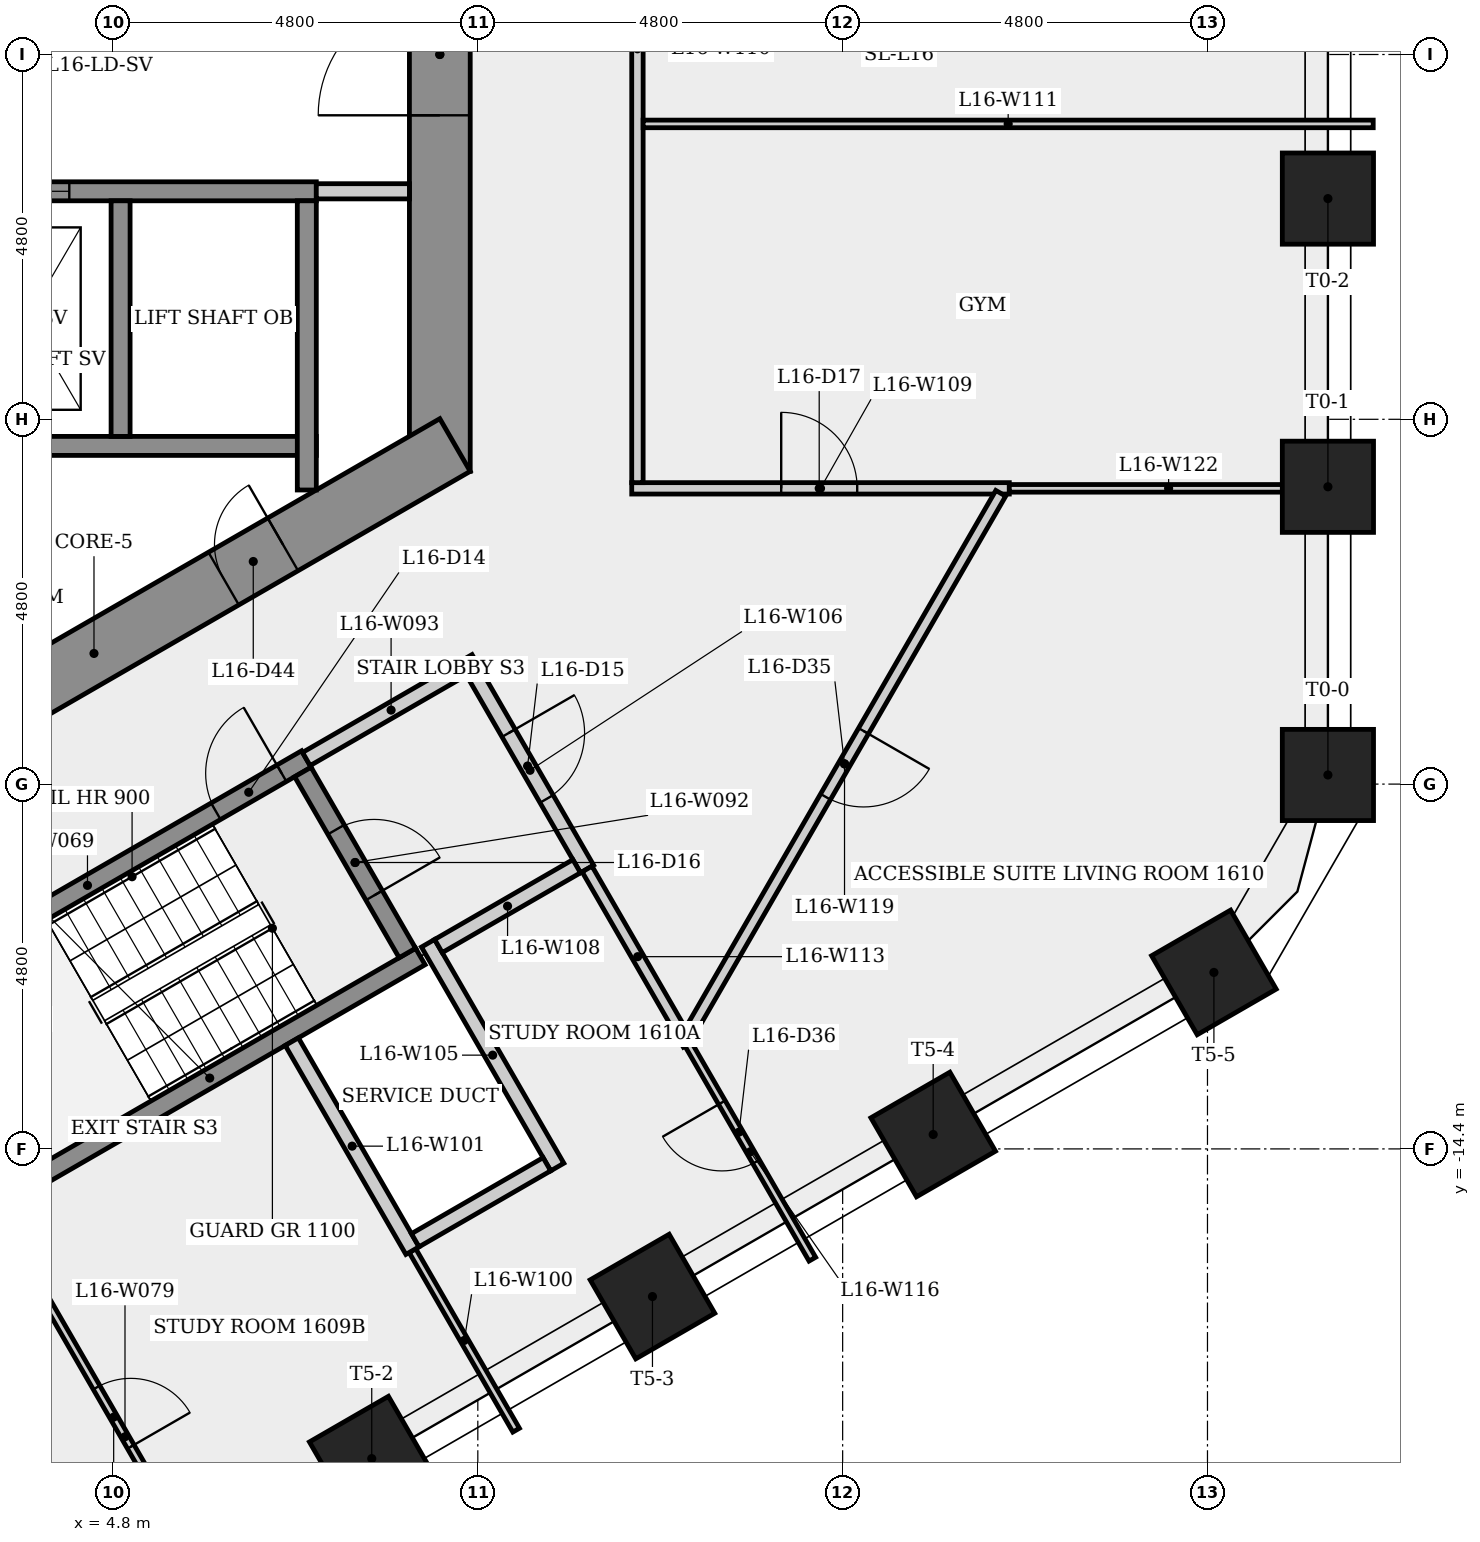
"""IFC4 building model, lengths in metres.
Left out: names, types, materials, properties, quantities, classifications, styles, units other than length and angle.
Written with IfcOpenShell. Run it as: python <this file> out.ifc"""

import sys

from ifc_helpers import new_model, si_unit, direction, frame, frame_2d, origin, origin_2d, place, context, subcontext, project, spatial, rectangle, extrude, element, fill, save


model = new_model("IFC4")
c1 = context("Model", 3, precision=1e-05, world=origin(), true_north=direction((0.0, 1.0)))
c2 = subcontext(c1, "Body", "Model", "MODEL_VIEW")
j1 = project(units=[si_unit("LENGTHUNIT", "METRE"), si_unit("PLANEANGLEUNIT", "RADIAN")], contexts=[c1])
p1 = place(None, origin())
s1 = spatial("IfcSite", under=j1, at=p1, CompositionType="ELEMENT")
p2 = place(p1, origin())
s2 = spatial("IfcBuilding", under=s1, at=p2, CompositionType="ELEMENT")
p3 = place(p2, frame((0.0, 0.0, 62.9)))
s3 = spatial("IfcBuildingStorey", under=s2, at=p3, CompositionType="ELEMENT", Elevation=62.9)
p4 = place(p3, frame((9.1, -5.485, 0.0), z_axis=(0.0, 0.0, 1.0), x_axis=(0.0, 1.0, 0.0)))
e1 = element("IfcWall", 1, at=p4, inside=s3, PredefinedType="SHEAR", context=c2, shape_type="SweptSolid", body=[
    extrude(rectangle(XDim=10.97, YDim=0.8, at=frame_2d((5.485, 0.0))), origin(), (0.0, 0.0, 1.0), 3.4),
])
p5 = place(p4, frame((4.685, 0.0, 0.0)))
e2 = element("IfcOpeningElement", 2, at=p5, cuts=e1, PredefinedType="OPENING", context=c2, shape_type="SweptSolid", body=[
    extrude(rectangle(XDim=1.6, YDim=2.1, at=frame_2d((0.8, 1.05))), frame((0.0, 0.41, 0.0), z_axis=(0.0, -1.0, 0.0), x_axis=(1.0, 0.0, 0.0)), (0.0, 0.0, 1.0), 0.82),
])
p6 = place(p3, frame((-0.2, -10.623, 0.0), z_axis=(0.0, 0.0, 1.0), x_axis=(0.866023993627, 0.500002442456, 0.0)))
e3 = element("IfcWall", 3, at=p6, inside=s3, PredefinedType="SHEAR", context=c2, shape_type="SweptSolid", body=[
    extrude(rectangle(XDim=10.97, YDim=0.8, at=frame_2d((5.485, 0.0))), origin(), (0.0, 0.0, 1.0), 3.4),
])
p7 = place(p6, frame((0.9, 0.0, 0.0)))
e4 = element("IfcOpeningElement", 4, at=p7, cuts=e3, PredefinedType="OPENING", context=c2, shape_type="SweptSolid", body=[
    extrude(rectangle(XDim=0.9, YDim=2.1, at=frame_2d((0.45, 1.05))), frame((0.0, 0.41, 0.0), z_axis=(0.0, -1.0, 0.0), x_axis=(1.0, 0.0, 0.0)), (0.0, 0.0, 1.0), 0.82),
])
p8 = place(p6, frame((7.455, 0.0, 0.0)))
e5 = element("IfcOpeningElement", 5, at=p8, cuts=e3, PredefinedType="OPENING", context=c2, shape_type="SweptSolid", body=[
    extrude(rectangle(XDim=0.9, YDim=2.1, at=frame_2d((0.45, 1.05))), frame((0.0, 0.41, 0.0), z_axis=(0.0, -1.0, 0.0), x_axis=(1.0, 0.0, 0.0)), (0.0, 0.0, 1.0), 0.82),
])
for number, where, z_axis, x_axis in (
    (6, (20.785, -9.48, 0.0), (0.0, 0.0, 1.0), (1.0, 0.0, 0.0)),
    (7, (20.785, -5.688, 0.0), (0.0, 0.0, 1.0), (1.0, 0.0, 0.0)),
    (8, (20.785, -1.896, 0.0), (0.0, 0.0, 1.0), (1.0, 0.0, 0.0)),
    (9, (8.204, -18.475, 0.0), (0.0, 0.0, 1.0), (0.5, -0.866, 0.0)),
    (10, (11.898, -16.343, 0.0), (0.0, 0.0, 1.0), (0.5, -0.866, 0.0)),
    (11, (15.591, -14.21, 0.0), (0.0, 0.0, 1.0), (0.5, -0.866, 0.0)),
    (12, (19.285, -12.078, 0.0), (0.0, 0.0, 1.0), (0.5, -0.866, 0.0)),
):
    element("IfcColumn", number, at=place(p3, frame(where, z_axis=z_axis, x_axis=x_axis)), inside=s3, PredefinedType="COLUMN", context=c2, shape_type="SweptSolid", body=[
        extrude(rectangle(XDim=1.2, YDim=1.2, at=origin_2d()), origin(), (0.0, 0.0, 1.0), 3.4),
    ])
p9 = place(p3, frame((-7.225, -5.15, 0.0), z_axis=(0.0, 0.0, 1.0), x_axis=(1.0, 0.0, 0.0)))
e13 = element("IfcWall", 13, at=p9, inside=s3, PredefinedType="SHEAR", context=c2, shape_type="SweptSolid", body=[
    extrude(rectangle(XDim=14.7, YDim=0.25, at=frame_2d((7.35, 0.0))), origin(), (0.0, 0.0, 1.0), 3.0),
])
p10 = place(p3, frame((-7.225, -1.8, 0.0), z_axis=(0.0, 0.0, 1.0), x_axis=(1.0, 0.0, 0.0)))
e14 = element("IfcWall", 14, at=p10, inside=s3, PredefinedType="SHEAR", context=c2, shape_type="SweptSolid", body=[
    extrude(rectangle(XDim=14.7, YDim=0.25, at=frame_2d((7.35, 0.0))), origin(), (0.0, 0.0, 1.0), 3.0),
])
p11 = place(p10, frame((0.597, 0.0, 0.0)))
e15 = element("IfcOpeningElement", 15, at=p11, cuts=e14, PredefinedType="OPENING", context=c2, shape_type="SweptSolid", body=[
    extrude(rectangle(XDim=1.1, YDim=2.1, at=frame_2d((0.55, 1.05))), frame((0.0, 0.135, 0.0), z_axis=(0.0, -1.0, 0.0), x_axis=(1.0, 0.0, 0.0)), (0.0, 0.0, 1.0), 0.27),
])
p12 = place(p10, frame((3.0, 0.0, 0.0)))
e16 = element("IfcOpeningElement", 16, at=p12, cuts=e14, PredefinedType="OPENING", context=c2, shape_type="SweptSolid", body=[
    extrude(rectangle(XDim=1.1, YDim=2.1, at=frame_2d((0.55, 1.05))), frame((0.0, 0.135, 0.0), z_axis=(0.0, -1.0, 0.0), x_axis=(1.0, 0.0, 0.0)), (0.0, 0.0, 1.0), 0.27),
])
p13 = place(p10, frame((5.45, 0.0, 0.0)))
e17 = element("IfcOpeningElement", 17, at=p13, cuts=e14, PredefinedType="OPENING", context=c2, shape_type="SweptSolid", body=[
    extrude(rectangle(XDim=1.1, YDim=2.1, at=frame_2d((0.55, 1.05))), frame((0.0, 0.135, 0.0), z_axis=(0.0, -1.0, 0.0), x_axis=(1.0, 0.0, 0.0)), (0.0, 0.0, 1.0), 0.27),
])
p14 = place(p10, frame((7.9, 0.0, 0.0)))
e18 = element("IfcOpeningElement", 18, at=p14, cuts=e14, PredefinedType="OPENING", context=c2, shape_type="SweptSolid", body=[
    extrude(rectangle(XDim=1.1, YDim=2.1, at=frame_2d((0.55, 1.05))), frame((0.0, 0.135, 0.0), z_axis=(0.0, -1.0, 0.0), x_axis=(1.0, 0.0, 0.0)), (0.0, 0.0, 1.0), 0.27),
])
p15 = place(p10, frame((10.35, 0.0, 0.0)))
e19 = element("IfcOpeningElement", 19, at=p15, cuts=e14, PredefinedType="OPENING", context=c2, shape_type="SweptSolid", body=[
    extrude(rectangle(XDim=1.1, YDim=2.1, at=frame_2d((0.55, 1.05))), frame((0.0, 0.135, 0.0), z_axis=(0.0, -1.0, 0.0), x_axis=(1.0, 0.0, 0.0)), (0.0, 0.0, 1.0), 0.27),
])
p16 = place(p3, frame((1.585, -12.595, 0.0), z_axis=(0.0, 0.0, 1.0), x_axis=(0.866036417653, 0.499980922934, 0.0)))
e20 = element("IfcWall", 20, at=p16, inside=s3, PredefinedType="SHEAR", context=c2, shape_type="SweptSolid", body=[
    extrude(rectangle(XDim=6.65, YDim=0.25, at=frame_2d((3.325, 0.0))), origin(), (0.0, 0.0, 1.0), 3.0),
])
p17 = place(p16, frame((5.275, 0.0, 0.0)))
e21 = element("IfcOpeningElement", 21, at=p17, cuts=e20, PredefinedType="OPENING", context=c2, shape_type="SweptSolid", body=[
    extrude(rectangle(XDim=1.0, YDim=2.1, at=frame_2d((0.5, 1.05))), frame((0.0, 0.135, 0.0), z_axis=(0.0, -1.0, 0.0), x_axis=(1.0, 0.0, 0.0)), (0.0, 0.0, 1.0), 0.27),
])
p18 = place(p3, frame((3.709, -16.024, 0.0), z_axis=(0.0, 0.0, 1.0), x_axis=(0.499986116641, -0.866033419197, 0.0)))
e22 = element("IfcWall", 22, at=p18, inside=s3, PredefinedType="PARTITIONING", context=c2, shape_type="SweptSolid", body=[
    extrude(rectangle(XDim=4.996, YDim=0.1, at=frame_2d((2.498, 0.0))), origin(), (0.0, 0.0, 1.0), 3.0),
])
p19 = place(p18, frame((1.75, 0.0, 0.0)))
e23 = element("IfcOpeningElement", 23, at=p19, cuts=e22, PredefinedType="OPENING", context=c2, shape_type="SweptSolid", body=[
    extrude(rectangle(XDim=0.9, YDim=2.1, at=frame_2d((0.45, 1.05))), frame((0.0, 0.06, 0.0), z_axis=(0.0, -1.0, 0.0), x_axis=(1.0, 0.0, 0.0)), (0.0, 0.0, 1.0), 0.12),
])
p20 = place(p3, frame((4.9, -1.925, 0.0), z_axis=(0.0, 0.0, 1.0), x_axis=(0.0, -1.0, 0.0)))
e24 = element("IfcWall", 24, at=p20, inside=s3, PredefinedType="SHEAR", context=c2, shape_type="SweptSolid", body=[
    extrude(rectangle(XDim=3.1, YDim=0.25, at=frame_2d((1.55, 0.0))), origin(), (0.0, 0.0, 1.0), 3.4),
])
p21 = place(p3, frame((3.301, -15.068, 0.0), z_axis=(0.0, 0.0, 1.0), x_axis=(0.866035036182, 0.499983315828, 0.0)))
e25 = element("IfcWall", 25, at=p21, inside=s3, PredefinedType="SHEAR", context=c2, shape_type="SweptSolid", body=[
    extrude(rectangle(XDim=6.4, YDim=0.25, at=frame_2d((3.2, 0.0))), origin(), (0.0, 0.0, 1.0), 3.0),
])
p22 = place(p3, frame((7.298, -9.441, 0.0), z_axis=(0.0, 0.0, 1.0), x_axis=(0.500034990121, -0.866005201286, 0.0)))
e26 = element("IfcWall", 26, at=p22, inside=s3, PredefinedType="SHEAR", context=c2, shape_type="SweptSolid", body=[
    extrude(rectangle(XDim=2.75, YDim=0.25, at=frame_2d((1.375, 0.0))), origin(), (0.0, 0.0, 1.0), 3.0),
])
p23 = place(p22, frame((0.875, 0.0, 0.0)))
e27 = element("IfcOpeningElement", 27, at=p23, cuts=e26, PredefinedType="OPENING", context=c2, shape_type="SweptSolid", body=[
    extrude(rectangle(XDim=1.0, YDim=2.1, at=frame_2d((0.5, 1.05))), frame((0.0, 0.135, 0.0), z_axis=(0.0, -1.0, 0.0), x_axis=(1.0, 0.0, 0.0)), (0.0, 0.0, 1.0), 0.27),
])
p24 = place(p3, frame((7.344, -9.27, 0.0), z_axis=(0.0, 0.0, 1.0), x_axis=(0.866005588531, 0.500034319456, 0.0)))
e28 = element("IfcWall", 28, at=p24, inside=s3, PredefinedType="PARTITIONING", context=c2, shape_type="SweptSolid", body=[
    extrude(rectangle(XDim=2.575, YDim=0.2, at=frame_2d((1.288, 0.0))), origin(), (0.0, 0.0, 1.0), 3.0),
])
p25 = place(p3, frame((7.35, -1.925, 0.0), z_axis=(0.0, 0.0, 1.0), x_axis=(0.0, -1.0, 0.0)))
e29 = element("IfcWall", 29, at=p25, inside=s3, PredefinedType="SHEAR", context=c2, shape_type="SweptSolid", body=[
    extrude(rectangle(XDim=3.805, YDim=0.25, at=frame_2d((1.903, 0.0))), origin(), (0.0, 0.0, 1.0), 3.0),
])
p26 = place(p3, frame((8.74, -15.738, 0.0), z_axis=(0.0, 0.0, 1.0), x_axis=(0.499998754593, -0.86602612282, 0.0)))
e30 = element("IfcWall", 30, at=p26, inside=s3, PredefinedType="PARTITIONING", context=c2, shape_type="SweptSolid", body=[
    extrude(rectangle(XDim=2.728, YDim=0.1, at=frame_2d((1.364, 0.0))), origin(), (0.0, 0.0, 1.0), 3.0),
])
p27 = place(p3, frame((8.74, -15.739, 0.0), z_axis=(0.0, 0.0, 1.0), x_axis=(-0.500017526161, 0.866015284814, 0.0)))
e31 = element("IfcWall", 31, at=p27, inside=s3, PredefinedType="PLUMBINGWALL", context=c2, shape_type="SweptSolid", body=[
    extrude(rectangle(XDim=3.175, YDim=0.2, at=frame_2d((1.588, 0.0))), origin(), (0.0, 0.0, 1.0), 3.0),
])
p28 = place(p3, frame((8.7, -1.8, 0.0), z_axis=(0.0, 0.0, 1.0), x_axis=(-1.0, 0.0, 0.0)))
e32 = element("IfcWall", 32, at=p28, inside=s3, PredefinedType="PARTITIONING", context=c2, shape_type="SweptSolid", body=[
    extrude(rectangle(XDim=1.225, YDim=0.2, at=frame_2d((0.613, 0.0))), origin(), (0.0, 0.0, 1.0), 3.0),
])
p29 = place(p3, frame((8.945, -11.694, 0.0), z_axis=(0.0, 0.0, 1.0), x_axis=(0.500062241894, -0.865989465428, 0.0)))
e33 = element("IfcWall", 33, at=p29, inside=s3, PredefinedType="PLUMBINGWALL", context=c2, shape_type="SweptSolid", body=[
    extrude(rectangle(XDim=3.4, YDim=0.2, at=frame_2d((1.7, 0.0))), origin(), (0.0, 0.0, 1.0), 3.0),
])
p30 = place(p3, frame((9.537, -8.119, 0.0), z_axis=(0.0, 0.0, 1.0), x_axis=(0.499990139034, -0.866031096941, 0.0)))
e34 = element("IfcWall", 34, at=p30, inside=s3, PredefinedType="PARTITIONING", context=c2, shape_type="SweptSolid", body=[
    extrude(rectangle(XDim=3.0, YDim=0.2, at=frame_2d((1.5, 0.0))), origin(), (0.0, 0.0, 1.0), 3.0),
])
p31 = place(p30, frame((0.935, 0.0, 0.0)))
e35 = element("IfcOpeningElement", 35, at=p31, cuts=e34, PredefinedType="OPENING", context=c2, shape_type="SweptSolid", body=[
    extrude(rectangle(XDim=1.0, YDim=2.1, at=frame_2d((0.5, 1.05))), frame((0.0, 0.11, 0.0), z_axis=(0.0, -1.0, 0.0), x_axis=(1.0, 0.0, 0.0)), (0.0, 0.0, 1.0), 0.22),
])
p32 = place(p3, frame((10.509, -14.602, 0.0), z_axis=(0.0, 0.0, 1.0), x_axis=(-0.866010750942, -0.50002537861, 0.0)))
e36 = element("IfcWall", 36, at=p32, inside=s3, PredefinedType="PLUMBINGWALL", context=c2, shape_type="SweptSolid", body=[
    extrude(rectangle(XDim=2.0, YDim=0.2, at=frame_2d((1.0, 0.0))), origin(), (0.0, 0.0, 1.0), 3.0),
])
p33 = place(p3, frame((10.901, -10.681, 0.0), z_axis=(0.0, 0.0, 1.0), x_axis=(-0.866009402589, -0.500027713859, 0.0)))
e37 = element("IfcWall", 37, at=p33, inside=s3, PredefinedType="PARTITIONING", context=c2, shape_type="SweptSolid", body=[
    extrude(rectangle(XDim=2.1, YDim=0.2, at=frame_2d((1.05, 0.0))), origin(), (0.0, 0.0, 1.0), 3.0),
])
p34 = place(p3, frame((11.625, -5.708, 0.0), z_axis=(0.0, 0.0, 1.0), x_axis=(1.0, 0.0, 0.0)))
e38 = element("IfcWall", 38, at=p34, inside=s3, PredefinedType="PARTITIONING", context=c2, shape_type="SweptSolid", body=[
    extrude(rectangle(XDim=4.968, YDim=0.15, at=frame_2d((2.484, 0.0))), origin(), (0.0, 0.0, 1.0), 3.0),
])
p35 = place(p34, frame((1.967, 0.0, 0.0)))
e39 = element("IfcOpeningElement", 39, at=p35, cuts=e38, PredefinedType="OPENING", context=c2, shape_type="SweptSolid", body=[
    extrude(rectangle(XDim=1.0, YDim=2.1, at=frame_2d((0.5, 1.05))), frame((0.0, 0.085, 0.0), z_axis=(0.0, -1.0, 0.0), x_axis=(1.0, 0.0, 0.0)), (0.0, 0.0, 1.0), 0.17),
])
p36 = place(p3, frame((11.7, -5.634, 0.0), z_axis=(0.0, 0.0, 1.0), x_axis=(0.0, 1.0, 0.0)))
e40 = element("IfcWall", 40, at=p36, inside=s3, PredefinedType="PARTITIONING", context=c2, shape_type="SweptSolid", body=[
    extrude(rectangle(XDim=11.417, YDim=0.15, at=frame_2d((5.708, 0.0))), origin(), (0.0, 0.0, 1.0), 3.0),
])
p37 = place(p3, frame((11.775, -0.913, 0.0), z_axis=(0.0, 0.0, 1.0), x_axis=(1.0, 0.0, 0.0)))
e41 = element("IfcWall", 41, at=p37, inside=s3, PredefinedType="PARTITIONING", context=c2, shape_type="SweptSolid", body=[
    extrude(rectangle(XDim=9.606, YDim=0.1, at=frame_2d((4.803, 0.0))), origin(), (0.0, 0.0, 1.0), 3.0),
])
p38 = place(p3, frame((12.369, -13.024, 0.0), z_axis=(0.0, 0.0, 1.0), x_axis=(-0.499973693163, 0.866040591511, 0.0)))
e42 = element("IfcWall", 42, at=p38, inside=s3, PredefinedType="PARTITIONING", context=c2, shape_type="SweptSolid", body=[
    extrude(rectangle(XDim=2.664, YDim=0.15, at=frame_2d((1.332, 0.0))), origin(), (0.0, 0.0, 1.0), 3.0),
])
p39 = place(p3, frame((14.001, -15.851, 0.0), z_axis=(0.0, 0.0, 1.0), x_axis=(-0.499992215867, 0.866029897909, 0.0)))
e43 = element("IfcWall", 43, at=p39, inside=s3, PredefinedType="PARTITIONING", context=c2, shape_type="SweptSolid", body=[
    extrude(rectangle(XDim=3.264, YDim=0.1, at=frame_2d((1.632, 0.0))), origin(), (0.0, 0.0, 1.0), 3.0),
])
p40 = place(p39, frame((1.48, 0.0, 0.0)))
e44 = element("IfcOpeningElement", 44, at=p40, cuts=e43, PredefinedType="OPENING", context=c2, shape_type="SweptSolid", body=[
    extrude(rectangle(XDim=0.9, YDim=2.1, at=frame_2d((0.45, 1.05))), frame((0.0, 0.06, 0.0), z_axis=(0.0, -1.0, 0.0), x_axis=(1.0, 0.0, 0.0)), (0.0, 0.0, 1.0), 0.12),
])
p41 = place(p3, frame((16.48, -5.773, 0.0), z_axis=(0.0, 0.0, 1.0), x_axis=(-0.500000045627, -0.866025377442, 0.0)))
e45 = element("IfcWall", 45, at=p41, inside=s3, PredefinedType="PARTITIONING", context=c2, shape_type="SweptSolid", body=[
    extrude(rectangle(XDim=8.222, YDim=0.15, at=frame_2d((4.111, 0.0))), origin(), (0.0, 0.0, 1.0), 3.0),
])
p42 = place(p41, frame((3.611, 0.0, 0.0)))
e46 = element("IfcOpeningElement", 46, at=p42, cuts=e45, PredefinedType="OPENING", context=c2, shape_type="SweptSolid", body=[
    extrude(rectangle(XDim=1.0, YDim=2.1, at=frame_2d((0.5, 1.05))), frame((0.0, 0.085, 0.0), z_axis=(0.0, -1.0, 0.0), x_axis=(1.0, 0.0, 0.0)), (0.0, 0.0, 1.0), 0.17),
])
p43 = place(p3, frame((20.785, -5.708, 0.0), z_axis=(0.0, 0.0, 1.0), x_axis=(-1.0, 0.0, 0.0)))
e47 = element("IfcWall", 47, at=p43, inside=s3, PredefinedType="PARTITIONING", context=c2, shape_type="SweptSolid", body=[
    extrude(rectangle(XDim=4.192, YDim=0.1, at=frame_2d((2.096, 0.0))), origin(), (0.0, 0.0, 1.0), 3.0),
])
p44 = place(p15, origin())
e48 = element("IfcDoor", 48, at=p44, inside=s3, OperationType="SLIDING_TO_LEFT", PredefinedType="DOOR", context=c2, shape_type="SweptSolid", body=[
    extrude(rectangle(XDim=1.1, YDim=2.1, at=frame_2d((0.55, 1.05))), frame((0.0, 0.025, 0.0), z_axis=(0.0, -1.0, 0.0), x_axis=(1.0, 0.0, 0.0)), (0.0, 0.0, 1.0), 0.05),
])
fill(e19, e48)
p45 = place(p17, origin())
e49 = element("IfcDoor", 49, at=p45, inside=s3, OperationType="SINGLE_SWING_RIGHT", PredefinedType="DOOR", context=c2, shape_type="SweptSolid", body=[
    extrude(rectangle(XDim=1.0, YDim=2.1, at=frame_2d((0.5, 1.05))), frame((0.0, 0.025, 0.0), z_axis=(0.0, -1.0, 0.0), x_axis=(1.0, 0.0, 0.0)), (0.0, 0.0, 1.0), 0.05),
])
fill(e21, e49)
p46 = place(p31, origin())
e50 = element("IfcDoor", 50, at=p46, inside=s3, OperationType="SINGLE_SWING_LEFT", PredefinedType="DOOR", context=c2, shape_type="SweptSolid", body=[
    extrude(rectangle(XDim=1.0, YDim=2.1, at=frame_2d((0.5, 1.05))), frame((0.0, 0.025, 0.0), z_axis=(0.0, -1.0, 0.0), x_axis=(1.0, 0.0, 0.0)), (0.0, 0.0, 1.0), 0.05),
])
fill(e35, e50)
p47 = place(p23, origin())
e51 = element("IfcDoor", 51, at=p47, inside=s3, OperationType="SINGLE_SWING_RIGHT", PredefinedType="DOOR", context=c2, shape_type="SweptSolid", body=[
    extrude(rectangle(XDim=1.0, YDim=2.1, at=frame_2d((0.5, 1.05))), frame((0.0, 0.025, 0.0), z_axis=(0.0, -1.0, 0.0), x_axis=(1.0, 0.0, 0.0)), (0.0, 0.0, 1.0), 0.05),
])
fill(e27, e51)
p48 = place(p35, origin())
e52 = element("IfcDoor", 52, at=p48, inside=s3, OperationType="SINGLE_SWING_LEFT", PredefinedType="DOOR", context=c2, shape_type="SweptSolid", body=[
    extrude(rectangle(XDim=1.0, YDim=2.1, at=frame_2d((0.5, 1.05))), frame((0.0, 0.025, 0.0), z_axis=(0.0, -1.0, 0.0), x_axis=(1.0, 0.0, 0.0)), (0.0, 0.0, 1.0), 0.05),
])
fill(e39, e52)
p49 = place(p19, origin())
e53 = element("IfcDoor", 53, at=p49, inside=s3, OperationType="SINGLE_SWING_RIGHT", PredefinedType="DOOR", context=c2, shape_type="SweptSolid", body=[
    extrude(rectangle(XDim=0.9, YDim=2.1, at=frame_2d((0.45, 1.05))), frame((0.0, 0.025, 0.0), z_axis=(0.0, -1.0, 0.0), x_axis=(1.0, 0.0, 0.0)), (0.0, 0.0, 1.0), 0.05),
])
fill(e23, e53)
p50 = place(p42, origin())
e54 = element("IfcDoor", 54, at=p50, inside=s3, OperationType="SINGLE_SWING_LEFT", PredefinedType="DOOR", context=c2, shape_type="SweptSolid", body=[
    extrude(rectangle(XDim=1.0, YDim=2.1, at=frame_2d((0.5, 1.05))), frame((0.0, 0.025, 0.0), z_axis=(0.0, -1.0, 0.0), x_axis=(1.0, 0.0, 0.0)), (0.0, 0.0, 1.0), 0.05),
])
fill(e46, e54)
p51 = place(p40, origin())
e55 = element("IfcDoor", 55, at=p51, inside=s3, OperationType="SINGLE_SWING_RIGHT", PredefinedType="DOOR", context=c2, shape_type="SweptSolid", body=[
    extrude(rectangle(XDim=0.9, YDim=2.1, at=frame_2d((0.45, 1.05))), frame((0.0, 0.025, 0.0), z_axis=(0.0, -1.0, 0.0), x_axis=(1.0, 0.0, 0.0)), (0.0, 0.0, 1.0), 0.05),
])
fill(e44, e55)
p52 = place(p8, origin())
e56 = element("IfcDoor", 56, at=p52, inside=s3, OperationType="SINGLE_SWING_RIGHT", PredefinedType="DOOR", context=c2, shape_type="SweptSolid", body=[
    extrude(rectangle(XDim=0.9, YDim=2.1, at=frame_2d((0.45, 1.05))), frame((0.0, 0.025, 0.0), z_axis=(0.0, -1.0, 0.0), x_axis=(1.0, 0.0, 0.0)), (0.0, 0.0, 1.0), 0.05),
])
fill(e5, e56)
p53 = place(p5, origin())
e57 = element("IfcDoor", 57, at=p53, inside=s3, OperationType="SINGLE_SWING_LEFT", PredefinedType="DOOR", context=c2, shape_type="SweptSolid", body=[
    extrude(rectangle(XDim=1.6, YDim=2.1, at=frame_2d((0.8, 1.05))), frame((0.0, 0.025, 0.0), z_axis=(0.0, -1.0, 0.0), x_axis=(1.0, 0.0, 0.0)), (0.0, 0.0, 1.0), 0.05),
])
fill(e2, e57)
save(model, sys.argv[1])
